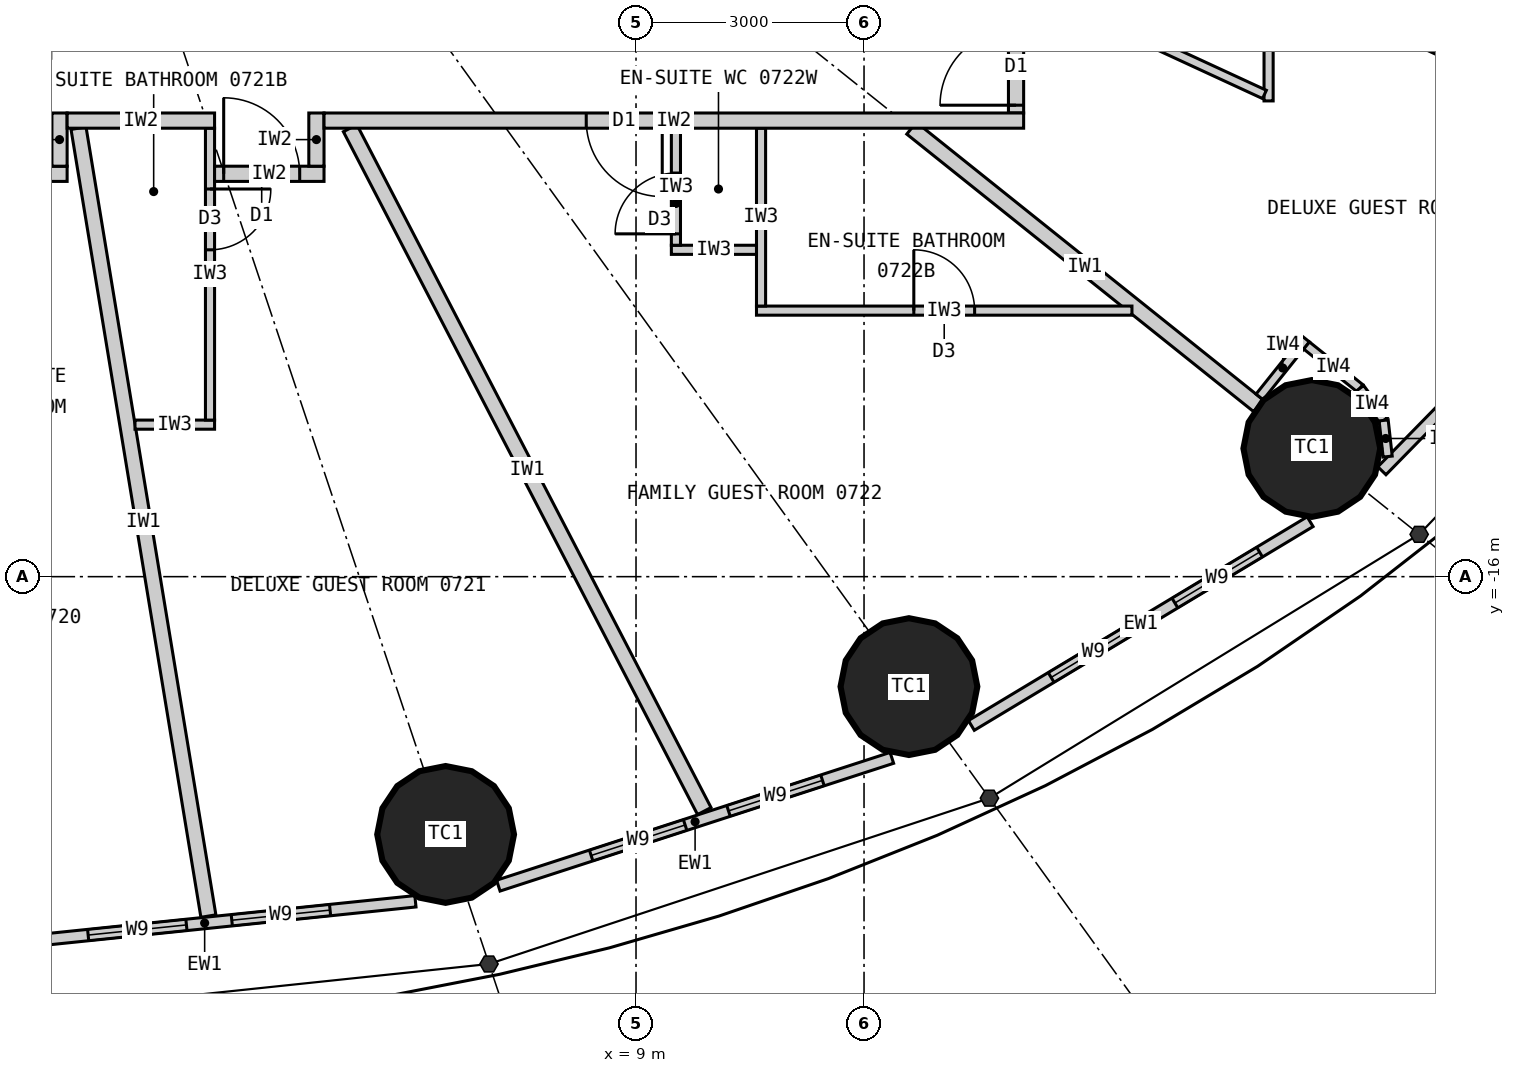
"""IFC4 building model, lengths in metres.
Left out: names, types, materials, properties, quantities, classifications, styles, units other than length and angle.
Written with IfcOpenShell. Run it as: python <this file> out.ifc"""

import sys

from ifc_helpers import new_model, si_unit, direction, frame, frame_2d, origin, origin_2d, place, context, subcontext, project, spatial, rectangle, circle, extrude, element, fill, save


model = new_model("IFC4")
c1 = context("Model", 3, precision=1e-05, world=origin(), true_north=direction((0.0, 1.0)))
c2 = subcontext(c1, "Body", "Model", "MODEL_VIEW")
j1 = project(units=[si_unit("LENGTHUNIT", "METRE"), si_unit("PLANEANGLEUNIT", "RADIAN")], contexts=[c1])
p1 = place(None, origin())
s1 = spatial("IfcSite", under=j1, at=p1, CompositionType="ELEMENT")
p2 = place(p1, origin())
s2 = spatial("IfcBuilding", under=s1, at=p2, CompositionType="ELEMENT")
p3 = place(p2, frame((0.0, 0.0, 36.0)))
s3 = spatial("IfcBuildingStorey", under=s2, at=p3, CompositionType="ELEMENT", Elevation=36.0)
for number, where, z_axis, x_axis in (
    (1, (6.495, -19.391, 0.0), (0.0, 0.0, 1.0), (1.0, 0.0, 0.0)),
    (2, (12.591, -17.447, 0.0), (0.0, 0.0, 1.0), (1.0, 0.0, 0.0)),
    (3, (17.892, -14.313, 0.0), (0.0, 0.0, 1.0), (1.0, 0.0, 0.0)),
):
    element("IfcColumn", number, at=place(p3, frame(where, z_axis=z_axis, x_axis=x_axis)), inside=s3, PredefinedType="COLUMN", context=c2, shape_type="SweptSolid", body=[
        extrude(circle(Radius=0.9, at=origin_2d()), origin(), (0.0, 0.0, 1.0), 3.3),
    ])
p4 = place(p3, frame((0.551, -20.843, 0.0), z_axis=(0.0, 0.0, 1.0), x_axis=(0.994723735084, 0.102589915983, 0.0)))
e4 = element("IfcWall", 4, at=p4, inside=s3, PredefinedType="ELEMENTEDWALL", context=c2, shape_type="SweptSolid", body=[
    extrude(rectangle(XDim=5.576, YDim=0.15, at=frame_2d((2.788, 0.0))), origin(), (0.0, 0.0, 1.0), 3.12),
])
p5 = place(p4, frame((1.247, 0.0, 0.9)))
e5 = element("IfcOpeningElement", 5, at=p5, cuts=e4, PredefinedType="OPENING", context=c2, shape_type="SweptSolid", body=[
    extrude(rectangle(XDim=1.3, YDim=1.9, at=frame_2d((0.65, 0.95))), frame((0.0, 0.085, 0.0), z_axis=(0.0, -1.0, 0.0), x_axis=(1.0, 0.0, 0.0)), (0.0, 0.0, 1.0), 0.17),
])
p6 = place(p4, frame((3.147, 0.0, 0.9)))
e6 = element("IfcOpeningElement", 6, at=p6, cuts=e4, PredefinedType="OPENING", context=c2, shape_type="SweptSolid", body=[
    extrude(rectangle(XDim=1.3, YDim=1.9, at=frame_2d((0.65, 0.95))), frame((0.0, 0.085, 0.0), z_axis=(0.0, -1.0, 0.0), x_axis=(1.0, 0.0, 0.0)), (0.0, 0.0, 1.0), 0.17),
])
p7 = place(p3, frame((7.188, -20.065, 0.0), z_axis=(0.0, 0.0, 1.0), x_axis=(0.951138486029, 0.308764603532, 0.0)))
e7 = element("IfcWall", 7, at=p7, inside=s3, PredefinedType="ELEMENTEDWALL", context=c2, shape_type="SweptSolid", body=[
    extrude(rectangle(XDim=5.444, YDim=0.15, at=frame_2d((2.722, 0.0))), origin(), (0.0, 0.0, 1.0), 3.12),
])
p8 = place(p7, frame((1.284, 0.0, 0.9)))
e8 = element("IfcOpeningElement", 8, at=p8, cuts=e7, PredefinedType="OPENING", context=c2, shape_type="SweptSolid", body=[
    extrude(rectangle(XDim=1.3, YDim=1.9, at=frame_2d((0.65, 0.95))), frame((0.0, 0.085, 0.0), z_axis=(0.0, -1.0, 0.0), x_axis=(1.0, 0.0, 0.0)), (0.0, 0.0, 1.0), 0.17),
])
p9 = place(p7, frame((3.184, 0.0, 0.9)))
e9 = element("IfcOpeningElement", 9, at=p9, cuts=e7, PredefinedType="OPENING", context=c2, shape_type="SweptSolid", body=[
    extrude(rectangle(XDim=1.3, YDim=1.9, at=frame_2d((0.65, 0.95))), frame((0.0, 0.085, 0.0), z_axis=(0.0, -1.0, 0.0), x_axis=(1.0, 0.0, 0.0)), (0.0, 0.0, 1.0), 0.17),
])
p10 = place(p3, frame((13.412, -17.957, 0.0), z_axis=(0.0, 0.0, 1.0), x_axis=(0.856958191554, 0.515385931054, 0.0)))
e10 = element("IfcWall", 10, at=p10, inside=s3, PredefinedType="ELEMENTEDWALL", context=c2, shape_type="SweptSolid", body=[
    extrude(rectangle(XDim=5.201, YDim=0.15, at=frame_2d((2.601, 0.0))), origin(), (0.0, 0.0, 1.0), 3.12),
])
p11 = place(p10, frame((1.225, 0.0, 0.9)))
e11 = element("IfcOpeningElement", 11, at=p11, cuts=e10, PredefinedType="OPENING", context=c2, shape_type="SweptSolid", body=[
    extrude(rectangle(XDim=1.3, YDim=1.9, at=frame_2d((0.65, 0.95))), frame((0.0, 0.085, 0.0), z_axis=(0.0, -1.0, 0.0), x_axis=(1.0, 0.0, 0.0)), (0.0, 0.0, 1.0), 0.17),
])
p12 = place(p10, frame((3.125, 0.0, 0.9)))
e12 = element("IfcOpeningElement", 12, at=p12, cuts=e10, PredefinedType="OPENING", context=c2, shape_type="SweptSolid", body=[
    extrude(rectangle(XDim=1.3, YDim=1.9, at=frame_2d((0.65, 0.95))), frame((0.0, 0.085, 0.0), z_axis=(0.0, -1.0, 0.0), x_axis=(1.0, 0.0, 0.0)), (0.0, 0.0, 1.0), 0.17),
])
p13 = place(p3, frame((18.813, -14.607, 0.0), z_axis=(0.0, 0.0, 1.0), x_axis=(0.699612594083, 0.714522370679, 0.0)))
e13 = element("IfcWall", 13, at=p13, inside=s3, PredefinedType="ELEMENTEDWALL", context=c2, shape_type="SweptSolid", body=[
    extrude(rectangle(XDim=4.896, YDim=0.15, at=frame_2d((2.448, 0.0))), origin(), (0.0, 0.0, 1.0), 3.12),
])
p14 = place(p13, frame((1.077, 0.0, 0.9)))
e14 = element("IfcOpeningElement", 14, at=p14, cuts=e13, PredefinedType="OPENING", context=c2, shape_type="SweptSolid", body=[
    extrude(rectangle(XDim=1.3, YDim=1.9, at=frame_2d((0.65, 0.95))), frame((0.0, 0.085, 0.0), z_axis=(0.0, -1.0, 0.0), x_axis=(1.0, 0.0, 0.0)), (0.0, 0.0, 1.0), 0.17),
])
p15 = place(p13, frame((2.977, 0.0, 0.9)))
e15 = element("IfcOpeningElement", 15, at=p15, cuts=e13, PredefinedType="OPENING", context=c2, shape_type="SweptSolid", body=[
    extrude(rectangle(XDim=1.3, YDim=1.9, at=frame_2d((0.65, 0.95))), frame((0.0, 0.085, 0.0), z_axis=(0.0, -1.0, 0.0), x_axis=(1.0, 0.0, 0.0)), (0.0, 0.0, 1.0), 0.17),
])
p16 = place(p3, frame((1.665, -10.1, 0.0), z_axis=(0.0, 0.0, 1.0), x_axis=(0.162657606458, -0.986682574621, 0.0)))
e16 = element("IfcWall", 16, at=p16, inside=s3, PredefinedType="PARTITIONING", context=c2, shape_type="SweptSolid", body=[
    extrude(rectangle(XDim=10.505, YDim=0.2, at=frame_2d((5.252, 0.0))), origin(), (0.0, 0.0, 1.0), 3.12),
])
p17 = place(p3, frame((5.239, -10.1, 0.0), z_axis=(0.0, 0.0, 1.0), x_axis=(0.460422783389, -0.887699758103, 0.0)))
e17 = element("IfcWall", 17, at=p17, inside=s3, PredefinedType="PARTITIONING", context=c2, shape_type="SweptSolid", body=[
    extrude(rectangle(XDim=10.12, YDim=0.2, at=frame_2d((5.06, 0.0))), origin(), (0.0, 0.0, 1.0), 3.12),
])
p18 = place(p3, frame((12.625, -10.1, 0.0), z_axis=(0.0, 0.0, 1.0), x_axis=(0.780872884676, -0.624689953479, 0.0)))
e18 = element("IfcWall", 18, at=p18, inside=s3, PredefinedType="PARTITIONING", context=c2, shape_type="SweptSolid", body=[
    extrude(rectangle(XDim=5.845, YDim=0.2, at=frame_2d((2.922, 0.0))), origin(), (0.0, 0.0, 1.0), 2.32),
])
p19 = place(p3, frame((14.1, -6.512, 0.0), z_axis=(0.0, 0.0, 1.0), x_axis=(0.907842433118, -0.41931147925, 0.0)))
e19 = element("IfcWall", 19, at=p19, inside=s3, PredefinedType="PARTITIONING", context=c2, shape_type="SweptSolid", body=[
    extrude(rectangle(XDim=7.823, YDim=0.2, at=frame_2d((3.912, 0.0))), origin(), (0.0, 0.0, 1.0), 2.32),
])
p20 = place(p3, frame((17.323, -8.101, 0.0), z_axis=(0.0, 0.0, 1.0), x_axis=(0.0, -1.0, 0.0)))
e20 = element("IfcWall", 20, at=p20, inside=s3, PredefinedType="PARTITIONING", context=c2, shape_type="SweptSolid", body=[
    extrude(rectangle(XDim=1.64, YDim=0.12, at=frame_2d((0.82, 0.0))), origin(), (0.0, 0.0, 1.0), 3.12),
])
p21 = place(p3, frame((14.1, -8.193, 0.0), z_axis=(0.0, 0.0, 1.0), x_axis=(0.907836493557, -0.419324338628, 0.0)))
e21 = element("IfcWall", 21, at=p21, inside=s3, PredefinedType="PARTITIONING", context=c2, shape_type="SweptSolid", body=[
    extrude(rectangle(XDim=3.49, YDim=0.12, at=frame_2d((1.745, 0.0))), origin(), (0.0, 0.0, 1.0), 3.12),
])
p22 = place(p21, frame((0.75, 0.0, 0.0)))
e22 = element("IfcOpeningElement", 22, at=p22, cuts=e21, PredefinedType="OPENING", context=c2, shape_type="SweptSolid", body=[
    extrude(rectangle(XDim=0.8, YDim=2.1, at=frame_2d((0.4, 1.05))), frame((0.0, 0.07, 0.0), z_axis=(0.0, -1.0, 0.0), x_axis=(1.0, 0.0, 0.0)), (0.0, 0.0, 1.0), 0.14),
])
p23 = place(p3, frame((2.408, -14.0, 0.0), z_axis=(0.0, 0.0, 1.0), x_axis=(1.0, 0.0, 0.0)))
e23 = element("IfcWall", 23, at=p23, inside=s3, PredefinedType="PARTITIONING", context=c2, shape_type="SweptSolid", body=[
    extrude(rectangle(XDim=1.047, YDim=0.12, at=frame_2d((0.523, 0.0))), origin(), (0.0, 0.0, 1.0), 3.12),
])
p24 = place(p3, frame((3.395, -10.1, 0.0), z_axis=(0.0, 0.0, 1.0), x_axis=(0.0, -1.0, 0.0)))
e24 = element("IfcWall", 24, at=p24, inside=s3, PredefinedType="PARTITIONING", context=c2, shape_type="SweptSolid", body=[
    extrude(rectangle(XDim=3.84, YDim=0.12, at=frame_2d((1.92, 0.0))), origin(), (0.0, 0.0, 1.0), 3.12),
])
p25 = place(p24, frame((0.8, 0.0, 0.0)))
e25 = element("IfcOpeningElement", 25, at=p25, cuts=e24, PredefinedType="OPENING", context=c2, shape_type="SweptSolid", body=[
    extrude(rectangle(XDim=0.8, YDim=2.1, at=frame_2d((0.4, 1.05))), frame((0.0, 0.07, 0.0), z_axis=(0.0, -1.0, 0.0), x_axis=(1.0, 0.0, 0.0)), (0.0, 0.0, 1.0), 0.14),
])
p26 = place(p3, frame((15.525, -12.5, 0.0), z_axis=(0.0, 0.0, 1.0), x_axis=(-1.0, 0.0, 0.0)))
e26 = element("IfcWall", 26, at=p26, inside=s3, PredefinedType="PARTITIONING", context=c2, shape_type="SweptSolid", body=[
    extrude(rectangle(XDim=4.94, YDim=0.12, at=frame_2d((2.47, 0.0))), origin(), (0.0, 0.0, 1.0), 3.12),
])
p27 = place(p26, frame((2.07, 0.0, 0.0)))
e27 = element("IfcOpeningElement", 27, at=p27, cuts=e26, PredefinedType="OPENING", context=c2, shape_type="SweptSolid", body=[
    extrude(rectangle(XDim=0.8, YDim=2.1, at=frame_2d((0.4, 1.05))), frame((0.0, 0.07, 0.0), z_axis=(0.0, -1.0, 0.0), x_axis=(1.0, 0.0, 0.0)), (0.0, 0.0, 1.0), 0.14),
])
p28 = place(p3, frame((10.645, -10.1, 0.0), z_axis=(0.0, 0.0, 1.0), x_axis=(0.0, -1.0, 0.0)))
e28 = element("IfcWall", 28, at=p28, inside=s3, PredefinedType="PARTITIONING", context=c2, shape_type="SweptSolid", body=[
    extrude(rectangle(XDim=2.34, YDim=0.12, at=frame_2d((1.17, 0.0))), origin(), (0.0, 0.0, 1.0), 3.12),
])
p29 = place(p3, frame((10.585, -11.7, 0.0), z_axis=(0.0, 0.0, 1.0), x_axis=(-1.0, 0.0, 0.0)))
e29 = element("IfcWall", 29, at=p29, inside=s3, PredefinedType="PARTITIONING", context=c2, shape_type="SweptSolid", body=[
    extrude(rectangle(XDim=1.12, YDim=0.12, at=frame_2d((0.56, 0.0))), origin(), (0.0, 0.0, 1.0), 3.12),
])
p30 = place(p3, frame((9.525, -10.1, 0.0), z_axis=(0.0, 0.0, 1.0), x_axis=(0.0, -1.0, 0.0)))
e30 = element("IfcWall", 30, at=p30, inside=s3, PredefinedType="PARTITIONING", context=c2, shape_type="SweptSolid", body=[
    extrude(rectangle(XDim=1.54, YDim=0.12, at=frame_2d((0.77, 0.0))), origin(), (0.0, 0.0, 1.0), 3.12),
])
p31 = place(p30, frame((0.59, 0.0, 0.0)))
e31 = element("IfcOpeningElement", 31, at=p31, cuts=e30, PredefinedType="OPENING", context=c2, shape_type="SweptSolid", body=[
    extrude(rectangle(XDim=0.8, YDim=2.1, at=frame_2d((0.4, 1.05))), frame((0.0, 0.07, 0.0), z_axis=(0.0, -1.0, 0.0), x_axis=(1.0, 0.0, 0.0)), (0.0, 0.0, 1.0), 0.14),
])
p32 = place(p3, frame((1.515, -10.7, 0.0), z_axis=(0.0, 0.0, 1.0), x_axis=(-1.0, 0.0, 0.0)))
e32 = element("IfcWall", 32, at=p32, inside=s3, PredefinedType="PARTITIONING", context=c2, shape_type="SweptSolid", body=[
    extrude(rectangle(XDim=1.44, YDim=0.2, at=frame_2d((0.72, 0.0))), origin(), (0.0, 0.0, 1.0), 3.12),
])
p33 = place(p32, frame((0.32, 0.0, 0.0)))
e33 = element("IfcOpeningElement", 33, at=p33, cuts=e32, PredefinedType="OPENING", context=c2, shape_type="SweptSolid", body=[
    extrude(rectangle(XDim=1.0, YDim=2.2, at=frame_2d((0.5, 1.1))), frame((0.0, 0.11, 0.0), z_axis=(0.0, -1.0, 0.0), x_axis=(1.0, 0.0, 0.0)), (0.0, 0.0, 1.0), 0.22),
])
p34 = place(p3, frame((1.415, -9.9, 0.0), z_axis=(0.0, 0.0, 1.0), x_axis=(0.0, -1.0, 0.0)))
e34 = element("IfcWall", 34, at=p34, inside=s3, PredefinedType="PARTITIONING", context=c2, shape_type="SweptSolid", body=[
    extrude(rectangle(XDim=0.7, YDim=0.2, at=frame_2d((0.35, 0.0))), origin(), (0.0, 0.0, 1.0), 3.12),
])
p35 = place(p3, frame((4.895, -10.7, 0.0), z_axis=(0.0, 0.0, 1.0), x_axis=(-1.0, 0.0, 0.0)))
e35 = element("IfcWall", 35, at=p35, inside=s3, PredefinedType="PARTITIONING", context=c2, shape_type="SweptSolid", body=[
    extrude(rectangle(XDim=1.44, YDim=0.2, at=frame_2d((0.72, 0.0))), origin(), (0.0, 0.0, 1.0), 3.12),
])
p36 = place(p35, frame((0.32, 0.0, 0.0)))
e36 = element("IfcOpeningElement", 36, at=p36, cuts=e35, PredefinedType="OPENING", context=c2, shape_type="SweptSolid", body=[
    extrude(rectangle(XDim=1.0, YDim=2.2, at=frame_2d((0.5, 1.1))), frame((0.0, 0.11, 0.0), z_axis=(0.0, -1.0, 0.0), x_axis=(1.0, 0.0, 0.0)), (0.0, 0.0, 1.0), 0.22),
])
p37 = place(p3, frame((4.795, -9.9, 0.0), z_axis=(0.0, 0.0, 1.0), x_axis=(0.0, -1.0, 0.0)))
e37 = element("IfcWall", 37, at=p37, inside=s3, PredefinedType="PARTITIONING", context=c2, shape_type="SweptSolid", body=[
    extrude(rectangle(XDim=0.7, YDim=0.2, at=frame_2d((0.35, 0.0))), origin(), (0.0, 0.0, 1.0), 3.12),
])
p38 = place(p3, frame((14.0, -9.9, 0.0), z_axis=(0.0, 0.0, 1.0), x_axis=(0.0, 1.0, 0.0)))
e38 = element("IfcWall", 38, at=p38, inside=s3, PredefinedType="PARTITIONING", context=c2, shape_type="SweptSolid", body=[
    extrude(rectangle(XDim=5.827, YDim=0.2, at=frame_2d((2.914, 0.0))), origin(), (0.0, 0.0, 1.0), 3.12),
])
p39 = place(p38, frame((0.103, 0.0, 0.0)))
e39 = element("IfcOpeningElement", 39, at=p39, cuts=e38, PredefinedType="OPENING", context=c2, shape_type="SweptSolid", body=[
    extrude(rectangle(XDim=1.0, YDim=2.2, at=frame_2d((0.5, 1.1))), frame((0.0, 0.11, 0.0), z_axis=(0.0, -1.0, 0.0), x_axis=(1.0, 0.0, 0.0)), (0.0, 0.0, 1.0), 0.22),
])
p40 = place(p3, frame((14.1, -10.0, 0.0), z_axis=(0.0, 0.0, 1.0), x_axis=(-1.0, 0.0, 0.0)))
e40 = element("IfcWall", 40, at=p40, inside=s3, PredefinedType="PARTITIONING", context=c2, shape_type="SweptSolid", body=[
    extrude(rectangle(XDim=9.205, YDim=0.2, at=frame_2d((4.603, 0.0))), origin(), (0.0, 0.0, 1.0), 3.12),
])
p41 = place(p40, frame((4.755, 0.0, 0.0)))
e41 = element("IfcOpeningElement", 41, at=p41, cuts=e40, PredefinedType="OPENING", context=c2, shape_type="SweptSolid", body=[
    extrude(rectangle(XDim=1.0, YDim=2.2, at=frame_2d((0.5, 1.1))), frame((0.0, 0.11, 0.0), z_axis=(0.0, -1.0, 0.0), x_axis=(1.0, 0.0, 0.0)), (0.0, 0.0, 1.0), 0.22),
])
p42 = place(p3, frame((3.455, -10.0, 0.0), z_axis=(0.0, 0.0, 1.0), x_axis=(-1.0, 0.0, 0.0)))
e42 = element("IfcWall", 42, at=p42, inside=s3, PredefinedType="PARTITIONING", context=c2, shape_type="SweptSolid", body=[
    extrude(rectangle(XDim=1.94, YDim=0.2, at=frame_2d((0.97, 0.0))), origin(), (0.0, 0.0, 1.0), 3.12),
])
p43 = place(p3, frame((17.205, -13.635, 0.0), z_axis=(0.0, 0.0, 1.0), x_axis=(0.624756144097, 0.780819928289, 0.0)))
e43 = element("IfcWall", 43, at=p43, inside=s3, PredefinedType="PARTITIONING", context=c2, shape_type="SweptSolid", body=[
    extrude(rectangle(XDim=0.975, YDim=0.12, at=frame_2d((0.487, 0.0))), origin(), (0.0, 0.0, 1.0), 3.12),
])
p44 = place(p3, frame((17.823, -12.959, 0.0), z_axis=(0.0, 0.0, 1.0), x_axis=(0.780895271023, -0.624661969144, 0.0)))
e44 = element("IfcWall", 44, at=p44, inside=s3, PredefinedType="PARTITIONING", context=c2, shape_type="SweptSolid", body=[
    extrude(rectangle(XDim=0.9, YDim=0.12, at=frame_2d((0.45, 0.0))), origin(), (0.0, 0.0, 1.0), 3.12),
])
p45 = place(p3, frame((18.526, -13.521, 0.0), z_axis=(0.0, 0.0, 1.0), x_axis=(0.592532503205, -0.805546542818, 0.0)))
e45 = element("IfcWall", 45, at=p45, inside=s3, PredefinedType="PARTITIONING", context=c2, shape_type="SweptSolid", body=[
    extrude(rectangle(XDim=0.525, YDim=0.12, at=frame_2d((0.262, 0.0))), origin(), (0.0, 0.0, 1.0), 3.12),
])
p46 = place(p3, frame((18.837, -13.944, 0.0), z_axis=(0.0, 0.0, 1.0), x_axis=(0.110543348478, -0.993871303594, 0.0)))
e46 = element("IfcWall", 46, at=p46, inside=s3, PredefinedType="PARTITIONING", context=c2, shape_type="SweptSolid", body=[
    extrude(rectangle(XDim=0.479, YDim=0.12, at=frame_2d((0.24, 0.0))), origin(), (0.0, 0.0, 1.0), 3.12),
])
p47 = place(p5, origin())
e47 = element("IfcWindow", 47, at=p47, inside=s3, PartitioningType="SINGLE_PANEL", PredefinedType="WINDOW", context=c2, shape_type="SweptSolid", body=[
    extrude(rectangle(XDim=1.3, YDim=1.9, at=frame_2d((0.65, 0.95))), frame((0.0, 0.03, 0.0), z_axis=(0.0, -1.0, 0.0), x_axis=(1.0, 0.0, 0.0)), (0.0, 0.0, 1.0), 0.06),
])
fill(e5, e47)
p48 = place(p6, origin())
e48 = element("IfcWindow", 48, at=p48, inside=s3, PartitioningType="SINGLE_PANEL", PredefinedType="WINDOW", context=c2, shape_type="SweptSolid", body=[
    extrude(rectangle(XDim=1.3, YDim=1.9, at=frame_2d((0.65, 0.95))), frame((0.0, 0.03, 0.0), z_axis=(0.0, -1.0, 0.0), x_axis=(1.0, 0.0, 0.0)), (0.0, 0.0, 1.0), 0.06),
])
fill(e6, e48)
p49 = place(p8, origin())
e49 = element("IfcWindow", 49, at=p49, inside=s3, PartitioningType="SINGLE_PANEL", PredefinedType="WINDOW", context=c2, shape_type="SweptSolid", body=[
    extrude(rectangle(XDim=1.3, YDim=1.9, at=frame_2d((0.65, 0.95))), frame((0.0, 0.03, 0.0), z_axis=(0.0, -1.0, 0.0), x_axis=(1.0, 0.0, 0.0)), (0.0, 0.0, 1.0), 0.06),
])
fill(e8, e49)
p50 = place(p9, origin())
e50 = element("IfcWindow", 50, at=p50, inside=s3, PartitioningType="SINGLE_PANEL", PredefinedType="WINDOW", context=c2, shape_type="SweptSolid", body=[
    extrude(rectangle(XDim=1.3, YDim=1.9, at=frame_2d((0.65, 0.95))), frame((0.0, 0.03, 0.0), z_axis=(0.0, -1.0, 0.0), x_axis=(1.0, 0.0, 0.0)), (0.0, 0.0, 1.0), 0.06),
])
fill(e9, e50)
p51 = place(p11, origin())
e51 = element("IfcWindow", 51, at=p51, inside=s3, PartitioningType="SINGLE_PANEL", PredefinedType="WINDOW", context=c2, shape_type="SweptSolid", body=[
    extrude(rectangle(XDim=1.3, YDim=1.9, at=frame_2d((0.65, 0.95))), frame((0.0, 0.03, 0.0), z_axis=(0.0, -1.0, 0.0), x_axis=(1.0, 0.0, 0.0)), (0.0, 0.0, 1.0), 0.06),
])
fill(e11, e51)
p52 = place(p12, origin())
e52 = element("IfcWindow", 52, at=p52, inside=s3, PartitioningType="SINGLE_PANEL", PredefinedType="WINDOW", context=c2, shape_type="SweptSolid", body=[
    extrude(rectangle(XDim=1.3, YDim=1.9, at=frame_2d((0.65, 0.95))), frame((0.0, 0.03, 0.0), z_axis=(0.0, -1.0, 0.0), x_axis=(1.0, 0.0, 0.0)), (0.0, 0.0, 1.0), 0.06),
])
fill(e12, e52)
p53 = place(p39, origin())
e53 = element("IfcDoor", 53, at=p53, inside=s3, OperationType="SINGLE_SWING_LEFT", PredefinedType="DOOR", context=c2, shape_type="SweptSolid", body=[
    extrude(rectangle(XDim=1.0, YDim=2.2, at=frame_2d((0.5, 1.1))), frame((0.0, 0.025, 0.0), z_axis=(0.0, -1.0, 0.0), x_axis=(1.0, 0.0, 0.0)), (0.0, 0.0, 1.0), 0.05),
])
fill(e39, e53)
p54 = place(p25, origin())
e54 = element("IfcDoor", 54, at=p54, inside=s3, OperationType="SINGLE_SWING_LEFT", PredefinedType="DOOR", context=c2, shape_type="SweptSolid", body=[
    extrude(rectangle(XDim=0.8, YDim=2.1, at=frame_2d((0.4, 1.05))), frame((0.0, 0.025, 0.0), z_axis=(0.0, -1.0, 0.0), x_axis=(1.0, 0.0, 0.0)), (0.0, 0.0, 1.0), 0.05),
])
fill(e25, e54)
p55 = place(p36, origin())
e55 = element("IfcDoor", 55, at=p55, inside=s3, OperationType="SINGLE_SWING_RIGHT", PredefinedType="DOOR", context=c2, shape_type="SweptSolid", body=[
    extrude(rectangle(XDim=1.0, YDim=2.2, at=frame_2d((0.5, 1.1))), frame((0.0, 0.025, 0.0), z_axis=(0.0, -1.0, 0.0), x_axis=(1.0, 0.0, 0.0)), (0.0, 0.0, 1.0), 0.05),
])
fill(e36, e55)
p56 = place(p27, origin())
e56 = element("IfcDoor", 56, at=p56, inside=s3, OperationType="SINGLE_SWING_RIGHT", PredefinedType="DOOR", context=c2, shape_type="SweptSolid", body=[
    extrude(rectangle(XDim=0.8, YDim=2.1, at=frame_2d((0.4, 1.05))), frame((0.0, 0.025, 0.0), z_axis=(0.0, -1.0, 0.0), x_axis=(1.0, 0.0, 0.0)), (0.0, 0.0, 1.0), 0.05),
])
fill(e27, e56)
p57 = place(p31, origin())
e57 = element("IfcDoor", 57, at=p57, inside=s3, OperationType="SINGLE_SWING_RIGHT", PredefinedType="DOOR", context=c2, shape_type="SweptSolid", body=[
    extrude(rectangle(XDim=0.8, YDim=2.1, at=frame_2d((0.4, 1.05))), frame((0.0, 0.025, 0.0), z_axis=(0.0, -1.0, 0.0), x_axis=(1.0, 0.0, 0.0)), (0.0, 0.0, 1.0), 0.05),
])
fill(e31, e57)
p58 = place(p41, origin())
e58 = element("IfcDoor", 58, at=p58, inside=s3, OperationType="SINGLE_SWING_LEFT", PredefinedType="DOOR", context=c2, shape_type="SweptSolid", body=[
    extrude(rectangle(XDim=1.0, YDim=2.2, at=frame_2d((0.5, 1.1))), frame((0.0, 0.025, 0.0), z_axis=(0.0, -1.0, 0.0), x_axis=(1.0, 0.0, 0.0)), (0.0, 0.0, 1.0), 0.05),
])
fill(e41, e58)
save(model, sys.argv[1])
